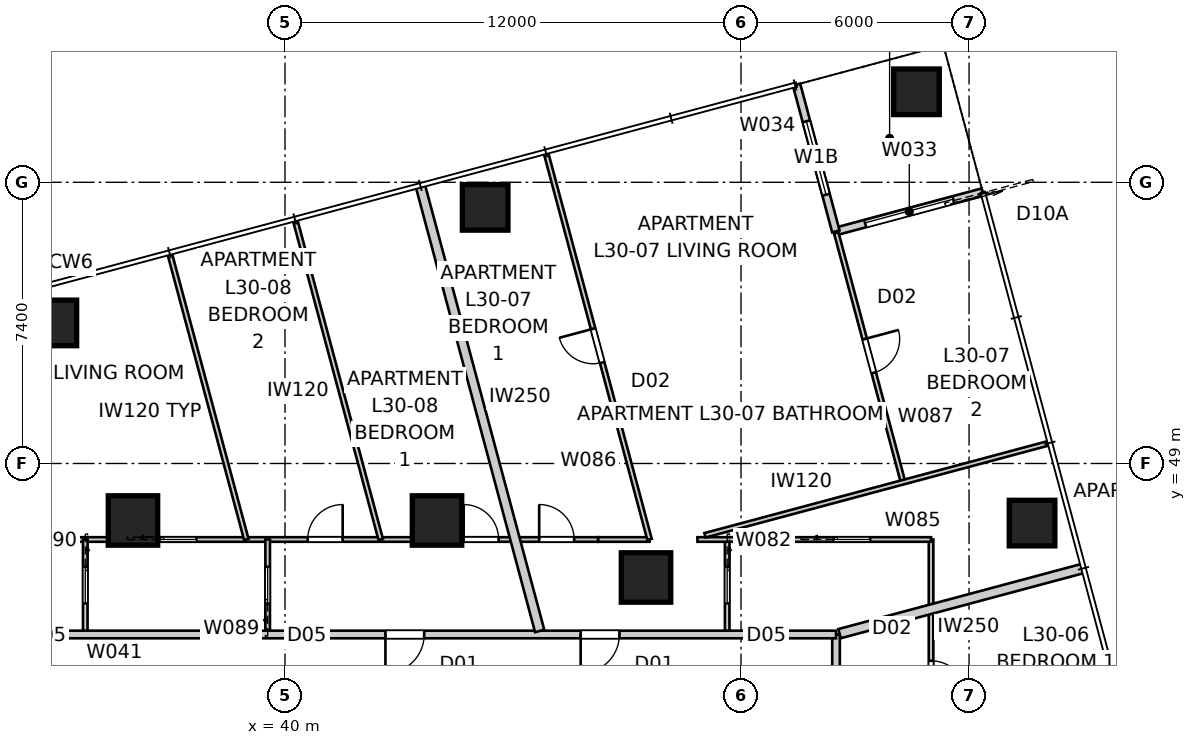
"""IFC4 building model, lengths in metres.
Left out: names, types, materials, properties, quantities, classifications, styles, units other than length and angle.
Written with IfcOpenShell. Run it as: python <this file> out.ifc"""

import sys

from ifc_helpers import new_model, si_unit, direction, frame, frame_2d, origin, origin_2d, place, context, subcontext, project, spatial, rectangle, extrude, element, fill, save


model = new_model("IFC4")
c1 = context("Model", 3, precision=1e-05, world=origin(), true_north=direction((0.0, 1.0)))
c2 = subcontext(c1, "Body", "Model", "MODEL_VIEW")
j1 = project(units=[si_unit("LENGTHUNIT", "METRE"), si_unit("PLANEANGLEUNIT", "RADIAN")], contexts=[c1])
p1 = place(None, origin())
s1 = spatial("IfcSite", under=j1, at=p1, CompositionType="ELEMENT")
p2 = place(p1, origin())
s2 = spatial("IfcBuilding", under=s1, at=p2, CompositionType="ELEMENT")
p3 = place(p2, frame((0.0, 0.0, 111.6)))
s3 = spatial("IfcBuildingStorey", under=s2, at=p3, CompositionType="ELEMENT", Elevation=111.6)
for number, where, z_axis, x_axis in (
    (1, (59.658, 47.432, -0.15), (0.0, 0.0, 1.0), (1.0, 0.0, 0.0)),
    (2, (56.617, 58.781, -0.15), (0.0, 0.0, 1.0), (1.0, 0.0, 0.0)),
    (3, (45.267, 55.74, -0.15), (0.0, 0.0, 1.0), (1.0, 0.0, 0.0)),
    (4, (33.918, 52.699, -0.15), (0.0, 0.0, 1.0), (1.0, 0.0, 0.0)),
):
    element("IfcColumn", number, at=place(p3, frame(where, z_axis=z_axis, x_axis=x_axis)), inside=s3, PredefinedType="COLUMN", context=c2, shape_type="SweptSolid", body=[
        extrude(rectangle(XDim=1.2, YDim=1.2, at=origin_2d()), origin(), (0.0, 0.0, 1.0), 3.55),
    ])
for number, where, z_axis, x_axis in (
    (5, (49.5, 46.0, 0.0), (0.0, 0.0, 1.0), (1.0, 0.0, 0.0)),
    (6, (44.0, 47.5, 0.0), (0.0, 0.0, 1.0), (1.0, 0.0, 0.0)),
    (7, (36.0, 47.5, 0.0), (0.0, 0.0, 1.0), (1.0, 0.0, 0.0)),
):
    element("IfcColumn", number, at=place(p3, frame(where, z_axis=z_axis, x_axis=x_axis)), inside=s3, PredefinedType="COLUMN", context=c2, shape_type="SweptSolid", body=[
        extrude(rectangle(XDim=1.3, YDim=1.3, at=origin_2d()), origin(), (0.0, 0.0, 1.0), 3.4),
    ])
p4 = place(p3, frame((58.359, 56.143, 0.0), z_axis=(0.0, 0.0, 1.0), x_axis=(-0.965919172068, -0.258843877716, 0.0)))
e8 = element("IfcWall", 8, at=p4, inside=s3, PredefinedType="SOLIDWALL", context=c2, shape_type="SweptSolid", body=[
    extrude(rectangle(XDim=4.0, YDim=0.2, at=frame_2d((2.0, 0.0))), origin(), (0.0, 0.0, 1.0), 3.25),
])
p5 = place(p4, frame((0.8, 0.0, 0.0)))
e9 = element("IfcOpeningElement", 9, at=p5, cuts=e8, PredefinedType="OPENING", context=c2, shape_type="SweptSolid", body=[
    extrude(rectangle(XDim=2.4, YDim=2.1, at=frame_2d((1.2, 1.05))), frame((0.0, 0.11, 0.0), z_axis=(0.0, -1.0, 0.0), x_axis=(1.0, 0.0, 0.0)), (0.0, 0.0, 1.0), 0.22),
])
p6 = place(p3, frame((54.496, 55.107, 0.0), z_axis=(0.0, 0.0, 1.0), x_axis=(-0.258786931944, 0.965934430412, 0.0)))
e10 = element("IfcWall", 10, at=p6, inside=s3, PredefinedType="SOLIDWALL", context=c2, shape_type="SweptSolid", body=[
    extrude(rectangle(XDim=4.0, YDim=0.2, at=frame_2d((2.0, 0.0))), origin(), (0.0, 0.0, 1.0), 3.25),
])
p7 = place(p6, frame((1.0, 0.0, 0.45)))
e11 = element("IfcOpeningElement", 11, at=p7, cuts=e10, PredefinedType="OPENING", context=c2, shape_type="SweptSolid", body=[
    extrude(rectangle(XDim=2.0, YDim=1.8, at=frame_2d((1.0, 0.9))), frame((0.0, 0.11, 0.0), z_axis=(0.0, -1.0, 0.0), x_axis=(1.0, 0.0, 0.0)), (0.0, 0.0, 1.0), 0.22),
])
p8 = place(p3, frame((54.5, 15.5, 0.0), z_axis=(0.0, 0.0, 1.0), x_axis=(0.0, 1.0, 0.0)))
e12 = element("IfcWall", 12, at=p8, inside=s3, PredefinedType="PARTITIONING", context=c2, shape_type="SweptSolid", body=[
    extrude(rectangle(XDim=29.0, YDim=0.2, at=frame_2d((14.5, 0.0))), origin(), (0.0, 0.0, 1.0), 3.25),
])
p9 = place(p8, frame((24.76, 0.0, 0.0)))
e13 = element("IfcOpeningElement", 13, at=p9, cuts=e12, PredefinedType="OPENING", context=c2, shape_type="SweptSolid", body=[
    extrude(rectangle(XDim=1.02, YDim=2.1, at=frame_2d((0.51, 1.05))), frame((0.0, 0.11, 0.0), z_axis=(0.0, -1.0, 0.0), x_axis=(1.0, 0.0, 0.0)), (0.0, 0.0, 1.0), 0.22),
])
p10 = place(p8, frame((5.829, 0.0, 0.0)))
e14 = element("IfcOpeningElement", 14, at=p10, cuts=e12, PredefinedType="OPENING", context=c2, shape_type="SweptSolid", body=[
    extrude(rectangle(XDim=1.02, YDim=2.34, at=frame_2d((0.51, 1.17))), frame((0.0, 0.11, 0.0), z_axis=(0.0, -1.0, 0.0), x_axis=(1.0, 0.0, 0.0)), (0.0, 0.0, 1.0), 0.22),
])
p11 = place(p8, frame((9.559, 0.0, 0.0)))
e15 = element("IfcOpeningElement", 15, at=p11, cuts=e12, PredefinedType="OPENING", context=c2, shape_type="SweptSolid", body=[
    extrude(rectangle(XDim=1.02, YDim=2.34, at=frame_2d((0.51, 1.17))), frame((0.0, 0.11, 0.0), z_axis=(0.0, -1.0, 0.0), x_axis=(1.0, 0.0, 0.0)), (0.0, 0.0, 1.0), 0.22),
])
p12 = place(p3, frame((54.5, 44.5, 0.0), z_axis=(0.0, 0.0, 1.0), x_axis=(-1.0, 0.0, 0.0)))
e16 = element("IfcWall", 16, at=p12, inside=s3, PredefinedType="PARTITIONING", context=c2, shape_type="SweptSolid", body=[
    extrude(rectangle(XDim=28.2, YDim=0.2, at=frame_2d((14.1, 0.0))), origin(), (0.0, 0.0, 1.0), 3.25),
])
p13 = place(p12, frame((10.837, 0.0, 0.0)))
e17 = element("IfcOpeningElement", 17, at=p13, cuts=e16, PredefinedType="OPENING", context=c2, shape_type="SweptSolid", body=[
    extrude(rectangle(XDim=1.02, YDim=2.34, at=frame_2d((0.51, 1.17))), frame((0.0, 0.11, 0.0), z_axis=(0.0, -1.0, 0.0), x_axis=(1.0, 0.0, 0.0)), (0.0, 0.0, 1.0), 0.22),
])
p14 = place(p12, frame((5.7, 0.0, 0.0)))
e18 = element("IfcOpeningElement", 18, at=p14, cuts=e16, PredefinedType="OPENING", context=c2, shape_type="SweptSolid", body=[
    extrude(rectangle(XDim=1.02, YDim=2.34, at=frame_2d((0.51, 1.17))), frame((0.0, 0.11, 0.0), z_axis=(0.0, -1.0, 0.0), x_axis=(1.0, 0.0, 0.0)), (0.0, 0.0, 1.0), 0.22),
])
p15 = place(p12, frame((26.127, 0.0, 0.0)))
e19 = element("IfcOpeningElement", 19, at=p15, cuts=e16, PredefinedType="OPENING", context=c2, shape_type="SweptSolid", body=[
    extrude(rectangle(XDim=1.02, YDim=2.34, at=frame_2d((0.51, 1.17))), frame((0.0, 0.11, 0.0), z_axis=(0.0, -1.0, 0.0), x_axis=(1.0, 0.0, 0.0)), (0.0, 0.0, 1.0), 0.22),
])
p16 = place(p3, frame((43.56, 56.318, 0.0), z_axis=(0.0, 0.0, 1.0), x_axis=(0.258824223352, -0.965924438766, 0.0)))
e20 = element("IfcWall", 20, at=p16, inside=s3, PredefinedType="PARTITIONING", context=c2, shape_type="SweptSolid", body=[
    extrude(rectangle(XDim=12.138, YDim=0.25, at=frame_2d((6.069, 0.0))), origin(), (0.0, 0.0, 1.0), 3.25),
])
p17 = place(p3, frame((61.012, 46.242, 0.0), z_axis=(0.0, 0.0, 1.0), x_axis=(-0.965929355837, -0.25880587229, 0.0)))
e21 = element("IfcWall", 21, at=p17, inside=s3, PredefinedType="PARTITIONING", context=c2, shape_type="SweptSolid", body=[
    extrude(rectangle(XDim=6.645, YDim=0.25, at=frame_2d((3.322, 0.0))), origin(), (0.0, 0.0, 1.0), 3.25),
])
p18 = place(p3, frame((57.0, 47.0, 0.0), z_axis=(0.0, 0.0, 1.0), x_axis=(0.0, -1.0, 0.0)))
e22 = element("IfcWall", 22, at=p18, inside=s3, PredefinedType="PARTITIONING", context=c2, shape_type="SweptSolid", body=[
    extrude(rectangle(XDim=34.0, YDim=0.12, at=frame_2d((17.0, 0.0))), origin(), (0.0, 0.0, 1.0), 2.55),
])
p19 = place(p18, frame((8.23, 0.0, 0.0)))
e23 = element("IfcOpeningElement", 23, at=p19, cuts=e22, PredefinedType="OPENING", context=c2, shape_type="SweptSolid", body=[
    extrude(rectangle(XDim=0.92, YDim=2.34, at=frame_2d((0.46, 1.17))), frame((0.0, 0.07, 0.0), z_axis=(0.0, -1.0, 0.0), x_axis=(1.0, 0.0, 0.0)), (0.0, 0.0, 1.0), 0.14),
])
p20 = place(p18, frame((3.192, 0.0, 0.0)))
e24 = element("IfcOpeningElement", 24, at=p20, cuts=e22, PredefinedType="OPENING", context=c2, shape_type="SweptSolid", body=[
    extrude(rectangle(XDim=0.92, YDim=2.34, at=frame_2d((0.46, 1.17))), frame((0.0, 0.07, 0.0), z_axis=(0.0, -1.0, 0.0), x_axis=(1.0, 0.0, 0.0)), (0.0, 0.0, 1.0), 0.14),
])
p21 = place(p18, frame((24.391, 0.0, 0.0)))
e25 = element("IfcOpeningElement", 25, at=p21, cuts=e22, PredefinedType="OPENING", context=c2, shape_type="SweptSolid", body=[
    extrude(rectangle(XDim=0.92, YDim=2.34, at=frame_2d((0.46, 1.17))), frame((0.0, 0.07, 0.0), z_axis=(0.0, -1.0, 0.0), x_axis=(1.0, 0.0, 0.0)), (0.0, 0.0, 1.0), 0.14),
])
p22 = place(p18, frame((21.702, 0.0, 0.0)))
e26 = element("IfcOpeningElement", 26, at=p22, cuts=e22, PredefinedType="OPENING", context=c2, shape_type="SweptSolid", body=[
    extrude(rectangle(XDim=0.92, YDim=2.34, at=frame_2d((0.46, 1.17))), frame((0.0, 0.07, 0.0), z_axis=(0.0, -1.0, 0.0), x_axis=(1.0, 0.0, 0.0)), (0.0, 0.0, 1.0), 0.14),
])
p23 = place(p18, frame((31.459, 0.0, 0.0)))
e27 = element("IfcOpeningElement", 27, at=p23, cuts=e22, PredefinedType="OPENING", context=c2, shape_type="SweptSolid", body=[
    extrude(rectangle(XDim=0.96, YDim=2.1, at=frame_2d((0.48, 1.05))), frame((0.0, 0.07, 0.0), z_axis=(0.0, -1.0, 0.0), x_axis=(1.0, 0.0, 0.0)), (0.0, 0.0, 1.0), 0.14),
])
p24 = place(p18, frame((13.759, 0.0, 0.0)))
e28 = element("IfcOpeningElement", 28, at=p24, cuts=e22, PredefinedType="OPENING", context=c2, shape_type="SweptSolid", body=[
    extrude(rectangle(XDim=0.96, YDim=2.1, at=frame_2d((0.48, 1.05))), frame((0.0, 0.07, 0.0), z_axis=(0.0, -1.0, 0.0), x_axis=(1.0, 0.0, 0.0)), (0.0, 0.0, 1.0), 0.14),
])
p25 = place(p3, frame((51.636, 47.0, 0.0), z_axis=(0.0, 0.0, 1.0), x_axis=(0.0, -1.0, 0.0)))
e29 = element("IfcWall", 29, at=p25, inside=s3, PredefinedType="PARTITIONING", context=c2, shape_type="SweptSolid", body=[
    extrude(rectangle(XDim=2.4, YDim=0.12, at=frame_2d((1.2, 0.0))), origin(), (0.0, 0.0, 1.0), 3.25),
])
p26 = place(p25, frame((0.72, 0.0, 0.0)))
e30 = element("IfcOpeningElement", 30, at=p26, cuts=e29, PredefinedType="OPENING", context=c2, shape_type="SweptSolid", body=[
    extrude(rectangle(XDim=0.96, YDim=2.1, at=frame_2d((0.48, 1.05))), frame((0.0, 0.07, 0.0), z_axis=(0.0, -1.0, 0.0), x_axis=(1.0, 0.0, 0.0)), (0.0, 0.0, 1.0), 0.14),
])
p27 = place(p3, frame((23.0, 47.0, 0.0), z_axis=(0.0, 0.0, 1.0), x_axis=(1.0, 0.0, 0.0)))
e31 = element("IfcWall", 31, at=p27, inside=s3, PredefinedType="PARTITIONING", context=c2, shape_type="SweptSolid", body=[
    extrude(rectangle(XDim=25.241, YDim=0.12, at=frame_2d((12.62, 0.0))), origin(), (0.0, 0.0, 1.0), 2.55),
])
p28 = place(p27, frame((21.702, 0.0, 0.0)))
e32 = element("IfcOpeningElement", 32, at=p28, cuts=e31, PredefinedType="OPENING", context=c2, shape_type="SweptSolid", body=[
    extrude(rectangle(XDim=0.92, YDim=2.34, at=frame_2d((0.46, 1.17))), frame((0.0, 0.07, 0.0), z_axis=(0.0, -1.0, 0.0), x_axis=(1.0, 0.0, 0.0)), (0.0, 0.0, 1.0), 0.14),
])
p29 = place(p27, frame((17.598, 0.0, 0.0)))
e33 = element("IfcOpeningElement", 33, at=p29, cuts=e31, PredefinedType="OPENING", context=c2, shape_type="SweptSolid", body=[
    extrude(rectangle(XDim=0.92, YDim=2.34, at=frame_2d((0.46, 1.17))), frame((0.0, 0.07, 0.0), z_axis=(0.0, -1.0, 0.0), x_axis=(1.0, 0.0, 0.0)), (0.0, 0.0, 1.0), 0.14),
])
p30 = place(p27, frame((23.689, 0.0, 0.0)))
e34 = element("IfcOpeningElement", 34, at=p30, cuts=e31, PredefinedType="OPENING", context=c2, shape_type="SweptSolid", body=[
    extrude(rectangle(XDim=0.92, YDim=2.34, at=frame_2d((0.46, 1.17))), frame((0.0, 0.07, 0.0), z_axis=(0.0, -1.0, 0.0), x_axis=(1.0, 0.0, 0.0)), (0.0, 0.0, 1.0), 0.14),
])
p31 = place(p27, frame((2.225, 0.0, 0.0)))
e35 = element("IfcOpeningElement", 35, at=p31, cuts=e31, PredefinedType="OPENING", context=c2, shape_type="SweptSolid", body=[
    extrude(rectangle(XDim=0.92, YDim=2.34, at=frame_2d((0.46, 1.17))), frame((0.0, 0.07, 0.0), z_axis=(0.0, -1.0, 0.0), x_axis=(1.0, 0.0, 0.0)), (0.0, 0.0, 1.0), 0.14),
])
p32 = place(p27, frame((13.709, 0.0, 0.0)))
e36 = element("IfcOpeningElement", 36, at=p32, cuts=e31, PredefinedType="OPENING", context=c2, shape_type="SweptSolid", body=[
    extrude(rectangle(XDim=0.96, YDim=2.1, at=frame_2d((0.48, 1.05))), frame((0.0, 0.07, 0.0), z_axis=(0.0, -1.0, 0.0), x_axis=(1.0, 0.0, 0.0)), (0.0, 0.0, 1.0), 0.14),
])
p33 = place(p3, frame((50.853, 47.0, 0.0), z_axis=(0.0, 0.0, 1.0), x_axis=(1.0, 0.0, 0.0)))
e37 = element("IfcWall", 37, at=p33, inside=s3, PredefinedType="PARTITIONING", context=c2, shape_type="SweptSolid", body=[
    extrude(rectangle(XDim=6.147, YDim=0.12, at=frame_2d((3.074, 0.0))), origin(), (0.0, 0.0, 1.0), 3.25),
])
p34 = place(p33, frame((3.585, 0.0, 0.0)))
e38 = element("IfcOpeningElement", 38, at=p34, cuts=e37, PredefinedType="OPENING", context=c2, shape_type="SweptSolid", body=[
    extrude(rectangle(XDim=0.96, YDim=2.1, at=frame_2d((0.48, 1.05))), frame((0.0, 0.07, 0.0), z_axis=(0.0, -1.0, 0.0), x_axis=(1.0, 0.0, 0.0)), (0.0, 0.0, 1.0), 0.14),
])
p35 = place(p3, frame((49.594, 47.0, 0.0), z_axis=(0.0, 0.0, 1.0), x_axis=(-0.258797552287, 0.965931585015, 0.0)))
e39 = element("IfcWall", 39, at=p35, inside=s3, PredefinedType="PARTITIONING", context=c2, shape_type="SweptSolid", body=[
    extrude(rectangle(XDim=10.522, YDim=0.12, at=frame_2d((5.261, 0.0))), origin(), (0.0, 0.0, 1.0), 2.722),
])
p36 = place(p35, frame((4.821, 0.0, 0.0)))
e40 = element("IfcOpeningElement", 40, at=p36, cuts=e39, PredefinedType="OPENING", context=c2, shape_type="SweptSolid", body=[
    extrude(rectangle(XDim=0.92, YDim=2.34, at=frame_2d((0.46, 1.17))), frame((0.0, 0.07, 0.0), z_axis=(0.0, -1.0, 0.0), x_axis=(1.0, 0.0, 0.0)), (0.0, 0.0, 1.0), 0.14),
])
p37 = place(p3, frame((54.506, 55.069, 0.0), z_axis=(0.0, 0.0, 1.0), x_axis=(0.258830095464, -0.965922865286, 0.0)))
e41 = element("IfcWall", 41, at=p37, inside=s3, PredefinedType="PARTITIONING", context=c2, shape_type="SweptSolid", body=[
    extrude(rectangle(XDim=6.793, YDim=0.12, at=frame_2d((3.396, 0.0))), origin(), (0.0, 0.0, 1.0), 3.25),
])
p38 = place(p37, frame((2.892, 0.0, 0.0)))
e42 = element("IfcOpeningElement", 42, at=p38, cuts=e41, PredefinedType="OPENING", context=c2, shape_type="SweptSolid", body=[
    extrude(rectangle(XDim=0.92, YDim=2.34, at=frame_2d((0.46, 1.17))), frame((0.0, 0.07, 0.0), z_axis=(0.0, -1.0, 0.0), x_axis=(1.0, 0.0, 0.0)), (0.0, 0.0, 1.0), 0.14),
])
p39 = place(p3, frame((60.089, 49.532, 0.0), z_axis=(0.0, 0.0, 1.0), x_axis=(-0.965927203676, -0.25881390457, 0.0)))
e43 = element("IfcWall", 43, at=p39, inside=s3, PredefinedType="PARTITIONING", context=c2, shape_type="SweptSolid", body=[
    extrude(rectangle(XDim=9.357, YDim=0.12, at=frame_2d((4.678, 0.0))), origin(), (0.0, 0.0, 1.0), 2.638),
])
p40 = place(p3, frame((39.544, 44.6, 0.0), z_axis=(0.0, 0.0, 1.0), x_axis=(0.0, 1.0, 0.0)))
e44 = element("IfcWall", 44, at=p40, inside=s3, PredefinedType="PARTITIONING", context=c2, shape_type="SweptSolid", body=[
    extrude(rectangle(XDim=2.4, YDim=0.12, at=frame_2d((1.2, 0.0))), origin(), (0.0, 0.0, 1.0), 3.25),
])
p41 = place(p40, frame((0.72, 0.0, 0.0)))
e45 = element("IfcOpeningElement", 45, at=p41, cuts=e44, PredefinedType="OPENING", context=c2, shape_type="SweptSolid", body=[
    extrude(rectangle(XDim=0.96, YDim=2.1, at=frame_2d((0.48, 1.05))), frame((0.0, 0.07, 0.0), z_axis=(0.0, -1.0, 0.0), x_axis=(1.0, 0.0, 0.0)), (0.0, 0.0, 1.0), 0.14),
])
p42 = place(p3, frame((34.745, 47.0, 0.0), z_axis=(0.0, 0.0, 1.0), x_axis=(0.0, -1.0, 0.0)))
e46 = element("IfcWall", 46, at=p42, inside=s3, PredefinedType="PARTITIONING", context=c2, shape_type="SweptSolid", body=[
    extrude(rectangle(XDim=2.4, YDim=0.12, at=frame_2d((1.2, 0.0))), origin(), (0.0, 0.0, 1.0), 3.25),
])
p43 = place(p42, frame((0.72, 0.0, 0.0)))
e47 = element("IfcOpeningElement", 47, at=p43, cuts=e46, PredefinedType="OPENING", context=c2, shape_type="SweptSolid", body=[
    extrude(rectangle(XDim=0.96, YDim=2.1, at=frame_2d((0.48, 1.05))), frame((0.0, 0.07, 0.0), z_axis=(0.0, -1.0, 0.0), x_axis=(1.0, 0.0, 0.0)), (0.0, 0.0, 1.0), 0.14),
])
p44 = place(p3, frame((36.969, 54.511, 0.0), z_axis=(0.0, 0.0, 1.0), x_axis=(0.258813509689, -0.965927309482, 0.0)))
e48 = element("IfcWall", 48, at=p44, inside=s3, PredefinedType="PARTITIONING", context=c2, shape_type="SweptSolid", body=[
    extrude(rectangle(XDim=7.776, YDim=0.12, at=frame_2d((3.888, 0.0))), origin(), (0.0, 0.0, 1.0), 3.25),
])
p45 = place(p3, frame((42.519, 47.0, 0.0), z_axis=(0.0, 0.0, 1.0), x_axis=(-0.258819860698, 0.965925607751, 0.0)))
e49 = element("IfcWall", 49, at=p45, inside=s3, PredefinedType="PARTITIONING", context=c2, shape_type="SweptSolid", body=[
    extrude(rectangle(XDim=8.691, YDim=0.12, at=frame_2d((4.346, 0.0))), origin(), (0.0, 0.0, 1.0), 3.25),
])
p46 = place(p3, frame((48.241, 47.0, 0.0), z_axis=(0.0, 0.0, 1.0), x_axis=(1.0, 0.0, 0.0)))
e50 = element("IfcWall", 50, at=p46, inside=s3, PredefinedType="PARTITIONING", context=c2, shape_type="SweptSolid", body=[
    extrude(rectangle(XDim=1.353, YDim=0.12, at=frame_2d((0.676, 0.0))), origin(), (0.0, 0.0, 1.0), 3.25),
])
p47 = place(p5, origin())
e51 = element("IfcDoor", 51, at=p47, inside=s3, OperationType="SLIDING_TO_LEFT", PredefinedType="DOOR", context=c2, shape_type="SweptSolid", body=[
    extrude(rectangle(XDim=2.4, YDim=2.1, at=frame_2d((1.2, 1.05))), frame((0.0, 0.025, 0.0), z_axis=(0.0, -1.0, 0.0), x_axis=(1.0, 0.0, 0.0)), (0.0, 0.0, 1.0), 0.05),
])
fill(e9, e51)
p48 = place(p7, origin())
e52 = element("IfcWindow", 52, at=p48, inside=s3, PartitioningType="SINGLE_PANEL", PredefinedType="WINDOW", context=c2, shape_type="SweptSolid", body=[
    extrude(rectangle(XDim=2.0, YDim=1.8, at=frame_2d((1.0, 0.9))), frame((0.0, 0.03, 0.0), z_axis=(0.0, -1.0, 0.0), x_axis=(1.0, 0.0, 0.0)), (0.0, 0.0, 1.0), 0.06),
])
fill(e11, e52)
p49 = place(p13, origin())
e53 = element("IfcDoor", 53, at=p49, inside=s3, OperationType="SINGLE_SWING_RIGHT", PredefinedType="DOOR", context=c2, shape_type="SweptSolid", body=[
    extrude(rectangle(XDim=1.02, YDim=2.34, at=frame_2d((0.51, 1.17))), frame((0.0, 0.025, 0.0), z_axis=(0.0, -1.0, 0.0), x_axis=(1.0, 0.0, 0.0)), (0.0, 0.0, 1.0), 0.05),
])
fill(e17, e53)
p50 = place(p14, origin())
e54 = element("IfcDoor", 54, at=p50, inside=s3, OperationType="SINGLE_SWING_RIGHT", PredefinedType="DOOR", context=c2, shape_type="SweptSolid", body=[
    extrude(rectangle(XDim=1.02, YDim=2.34, at=frame_2d((0.51, 1.17))), frame((0.0, 0.025, 0.0), z_axis=(0.0, -1.0, 0.0), x_axis=(1.0, 0.0, 0.0)), (0.0, 0.0, 1.0), 0.05),
])
fill(e18, e54)
p51 = place(p28, origin())
e55 = element("IfcDoor", 55, at=p51, inside=s3, OperationType="SINGLE_SWING_LEFT", PredefinedType="DOOR", context=c2, shape_type="SweptSolid", body=[
    extrude(rectangle(XDim=0.92, YDim=2.34, at=frame_2d((0.46, 1.17))), frame((0.0, 0.025, 0.0), z_axis=(0.0, -1.0, 0.0), x_axis=(1.0, 0.0, 0.0)), (0.0, 0.0, 1.0), 0.05),
])
fill(e32, e55)
p52 = place(p29, origin())
e56 = element("IfcDoor", 56, at=p52, inside=s3, OperationType="SINGLE_SWING_RIGHT", PredefinedType="DOOR", context=c2, shape_type="SweptSolid", body=[
    extrude(rectangle(XDim=0.92, YDim=2.34, at=frame_2d((0.46, 1.17))), frame((0.0, 0.025, 0.0), z_axis=(0.0, -1.0, 0.0), x_axis=(1.0, 0.0, 0.0)), (0.0, 0.0, 1.0), 0.05),
])
fill(e33, e56)
p53 = place(p41, origin())
e57 = element("IfcDoor", 57, at=p53, inside=s3, OperationType="SLIDING_TO_LEFT", PredefinedType="DOOR", context=c2, shape_type="SweptSolid", body=[
    extrude(rectangle(XDim=0.96, YDim=2.1, at=frame_2d((0.48, 1.05))), frame((0.0, 0.025, 0.0), z_axis=(0.0, -1.0, 0.0), x_axis=(1.0, 0.0, 0.0)), (0.0, 0.0, 1.0), 0.05),
])
fill(e45, e57)
p54 = place(p20, origin())
e58 = element("IfcDoor", 58, at=p54, inside=s3, OperationType="SINGLE_SWING_RIGHT", PredefinedType="DOOR", context=c2, shape_type="SweptSolid", body=[
    extrude(rectangle(XDim=0.92, YDim=2.34, at=frame_2d((0.46, 1.17))), frame((0.0, 0.025, 0.0), z_axis=(0.0, -1.0, 0.0), x_axis=(1.0, 0.0, 0.0)), (0.0, 0.0, 1.0), 0.05),
])
fill(e24, e58)
p55 = place(p26, origin())
e59 = element("IfcDoor", 59, at=p55, inside=s3, OperationType="SLIDING_TO_LEFT", PredefinedType="DOOR", context=c2, shape_type="SweptSolid", body=[
    extrude(rectangle(XDim=0.96, YDim=2.1, at=frame_2d((0.48, 1.05))), frame((0.0, 0.025, 0.0), z_axis=(0.0, -1.0, 0.0), x_axis=(1.0, 0.0, 0.0)), (0.0, 0.0, 1.0), 0.05),
])
fill(e30, e59)
p56 = place(p30, origin())
e60 = element("IfcDoor", 60, at=p56, inside=s3, OperationType="SINGLE_SWING_LEFT", PredefinedType="DOOR", context=c2, shape_type="SweptSolid", body=[
    extrude(rectangle(XDim=0.92, YDim=2.34, at=frame_2d((0.46, 1.17))), frame((0.0, 0.025, 0.0), z_axis=(0.0, -1.0, 0.0), x_axis=(1.0, 0.0, 0.0)), (0.0, 0.0, 1.0), 0.05),
])
fill(e34, e60)
p57 = place(p32, origin())
e61 = element("IfcDoor", 61, at=p57, inside=s3, OperationType="SLIDING_TO_LEFT", PredefinedType="DOOR", context=c2, shape_type="SweptSolid", body=[
    extrude(rectangle(XDim=0.96, YDim=2.1, at=frame_2d((0.48, 1.05))), frame((0.0, 0.025, 0.0), z_axis=(0.0, -1.0, 0.0), x_axis=(1.0, 0.0, 0.0)), (0.0, 0.0, 1.0), 0.05),
])
fill(e36, e61)
p58 = place(p43, origin())
e62 = element("IfcDoor", 62, at=p58, inside=s3, OperationType="SLIDING_TO_LEFT", PredefinedType="DOOR", context=c2, shape_type="SweptSolid", body=[
    extrude(rectangle(XDim=0.96, YDim=2.1, at=frame_2d((0.48, 1.05))), frame((0.0, 0.025, 0.0), z_axis=(0.0, -1.0, 0.0), x_axis=(1.0, 0.0, 0.0)), (0.0, 0.0, 1.0), 0.05),
])
fill(e47, e62)
p59 = place(p34, origin())
e63 = element("IfcDoor", 63, at=p59, inside=s3, OperationType="SLIDING_TO_LEFT", PredefinedType="DOOR", context=c2, shape_type="SweptSolid", body=[
    extrude(rectangle(XDim=0.96, YDim=2.1, at=frame_2d((0.48, 1.05))), frame((0.0, 0.025, 0.0), z_axis=(0.0, -1.0, 0.0), x_axis=(1.0, 0.0, 0.0)), (0.0, 0.0, 1.0), 0.05),
])
fill(e38, e63)
p60 = place(p36, origin())
e64 = element("IfcDoor", 64, at=p60, inside=s3, OperationType="SINGLE_SWING_RIGHT", PredefinedType="DOOR", context=c2, shape_type="SweptSolid", body=[
    extrude(rectangle(XDim=0.92, YDim=2.34, at=frame_2d((0.46, 1.17))), frame((0.0, 0.025, 0.0), z_axis=(0.0, -1.0, 0.0), x_axis=(1.0, 0.0, 0.0)), (0.0, 0.0, 1.0), 0.05),
])
fill(e40, e64)
p61 = place(p38, origin())
e65 = element("IfcDoor", 65, at=p61, inside=s3, OperationType="SINGLE_SWING_LEFT", PredefinedType="DOOR", context=c2, shape_type="SweptSolid", body=[
    extrude(rectangle(XDim=0.92, YDim=2.34, at=frame_2d((0.46, 1.17))), frame((0.0, 0.025, 0.0), z_axis=(0.0, -1.0, 0.0), x_axis=(1.0, 0.0, 0.0)), (0.0, 0.0, 1.0), 0.05),
])
fill(e42, e65)
save(model, sys.argv[1])
